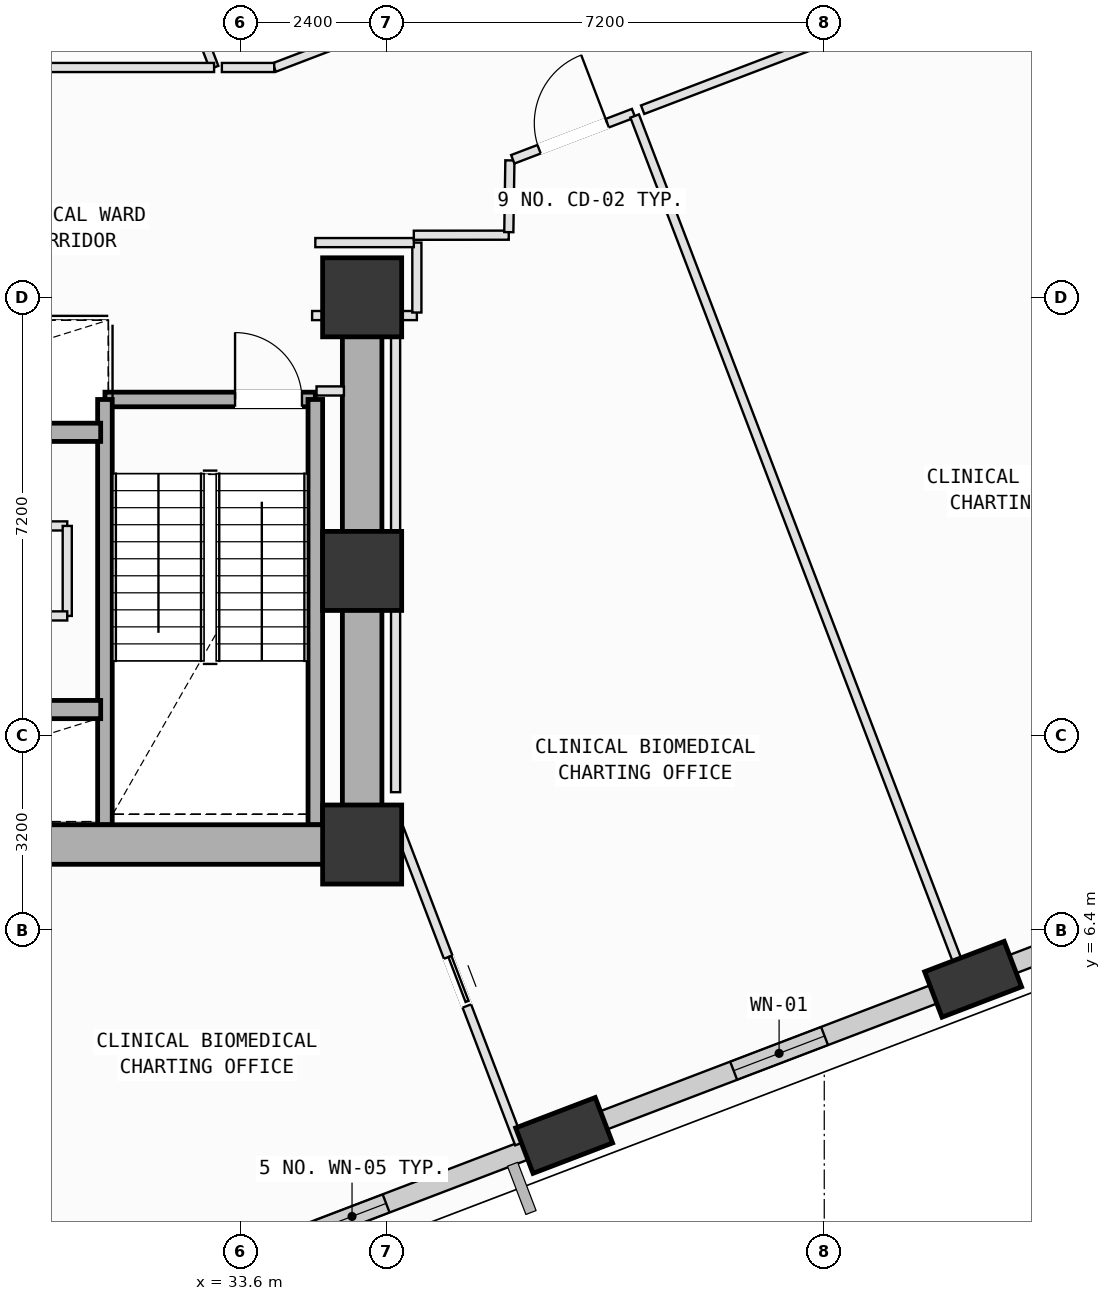
"""IFC4 building model, lengths in metres.
Left out: names, types, materials, properties, quantities, classifications, styles, units other than length and angle.
Written with IfcOpenShell. Run it as: python <this file> out.ifc"""

import sys

from ifc_helpers import new_model, si_unit, direction, frame, frame_2d, origin, origin_2d, place, context, subcontext, project, spatial, rectangle, extrude, element, fill, save


model = new_model("IFC4")
c1 = context("Model", 3, precision=1e-05, world=origin(), true_north=direction((0.0, 1.0)))
c2 = subcontext(c1, "Body", "Model", "MODEL_VIEW")
j1 = project(units=[si_unit("LENGTHUNIT", "METRE"), si_unit("PLANEANGLEUNIT", "RADIAN")], contexts=[c1])
p1 = place(None, origin())
s1 = spatial("IfcSite", under=j1, at=p1, CompositionType="ELEMENT")
p2 = place(p1, origin())
s2 = spatial("IfcBuilding", under=s1, at=p2, CompositionType="ELEMENT")
p3 = place(p2, frame((0.0, 0.0, 112.4)))
s3 = spatial("IfcBuildingStorey", under=s2, at=p3, CompositionType="ELEMENT", Elevation=112.4)
for number, where, z_axis, x_axis in (
    (1, (35.6, 7.8, 0.0), (0.0, 0.0, 1.0), (1.0, 0.0, 0.0)),
    (2, (35.6, 12.3, 0.0), (0.0, 0.0, 1.0), (1.0, 0.0, 0.0)),
    (3, (35.6, 16.8, 0.0), (0.0, 0.0, 1.0), (1.0, 0.0, 0.0)),
):
    element("IfcColumn", number, at=place(p3, frame(where, z_axis=z_axis, x_axis=x_axis)), inside=s3, PredefinedType="COLUMN", context=c2, shape_type="SweptSolid", body=[
        extrude(rectangle(XDim=1.3, YDim=1.3, at=origin_2d()), origin(), (0.0, 0.0, 1.0), 4.0),
    ])
p4 = place(p3, frame((38.922, 3.015, 0.002), z_axis=(0.089722632167, 0.02268918088, 0.995708315898), x_axis=(-0.573399819139, 0.818610197095, 0.033015036332)))
e4 = element("IfcColumn", 4, at=p4, inside=s3, PredefinedType="COLUMN", context=c2, shape_type="SweptSolid", body=[
    extrude(rectangle(XDim=1.4, YDim=0.8, at=origin_2d()), origin(), (0.0, 0.0, 1.0), 4.014),
])
p5 = place(p3, frame((45.648, 5.584, 0.002), z_axis=(0.078947790849, 0.050361148554, 0.995605846225), x_axis=(-0.801849419572, 0.596591609047, 0.033405992688)))
e5 = element("IfcColumn", 5, at=p5, inside=s3, PredefinedType="COLUMN", context=c2, shape_type="SweptSolid", body=[
    extrude(rectangle(XDim=1.4, YDim=0.8, at=origin_2d()), origin(), (0.0, 0.0, 1.0), 4.014),
])
p6 = place(p3, frame((38.631, 2.904, 0.0), z_axis=(0.0, 0.0, 1.0), x_axis=(-0.93420862639, -0.356727125936, 0.0)))
e6 = element("IfcWall", 6, at=p6, inside=s3, PredefinedType="SOLIDWALL", context=c2, shape_type="SweptSolid", body=[
    extrude(rectangle(XDim=6.214, YDim=0.32, at=frame_2d((3.107, 0.0))), origin(), (0.0, 0.0, 1.0), 3.165),
])
p7 = place(p6, frame((2.823, 0.0, 0.75)))
e7 = element("IfcOpeningElement", 7, at=p7, cuts=e6, PredefinedType="OPENING", context=c2, shape_type="SweptSolid", body=[
    extrude(rectangle(XDim=1.2, YDim=1.75, at=frame_2d((0.6, 0.875))), frame((0.0, 0.17, 0.0), z_axis=(0.0, -1.0, 0.0), x_axis=(1.0, 0.0, 0.0)), (0.0, 0.0, 1.0), 0.34),
])
p8 = place(p3, frame((45.358, 5.473, 0.0), z_axis=(0.0, 0.0, 1.0), x_axis=(-0.934195274734, -0.356762089724, 0.0)))
e8 = element("IfcWall", 8, at=p8, inside=s3, PredefinedType="SOLIDWALL", context=c2, shape_type="SweptSolid", body=[
    extrude(rectangle(XDim=6.209, YDim=0.32, at=frame_2d((3.104, 0.0))), origin(), (0.0, 0.0, 1.0), 3.165),
])
p9 = place(p8, frame((2.305, 0.0, 0.75)))
e9 = element("IfcOpeningElement", 9, at=p9, cuts=e8, PredefinedType="OPENING", context=c2, shape_type="SweptSolid", body=[
    extrude(rectangle(XDim=1.6, YDim=1.95, at=frame_2d((0.8, 0.975))), frame((0.0, 0.17, 0.0), z_axis=(0.0, -1.0, 0.0), x_axis=(1.0, 0.0, 0.0)), (0.0, 0.0, 1.0), 0.34),
])
p10 = place(p3, frame((52.091, 8.044, 0.0), z_axis=(0.0, 0.0, 1.0), x_axis=(-0.93419197885, -0.356770720005, 0.0)))
e10 = element("IfcWall", 10, at=p10, inside=s3, PredefinedType="SOLIDWALL", context=c2, shape_type="SweptSolid", body=[
    extrude(rectangle(XDim=6.218, YDim=0.32, at=frame_2d((3.109, 0.0))), origin(), (0.0, 0.0, 1.0), 3.165),
])
p11 = place(p10, frame((2.111, 0.0, 0.75)))
e11 = element("IfcOpeningElement", 11, at=p11, cuts=e10, PredefinedType="OPENING", context=c2, shape_type="SweptSolid", body=[
    extrude(rectangle(XDim=2.0, YDim=1.95, at=frame_2d((1.0, 0.975))), frame((0.0, 0.17, 0.0), z_axis=(0.0, -1.0, 0.0), x_axis=(1.0, 0.0, 0.0)), (0.0, 0.0, 1.0), 0.34),
])
p12 = place(p3, frame((31.37, 15.12, 0.0), z_axis=(0.0, 0.0, 1.0), x_axis=(1.0, 0.0, 0.0)))
e12 = element("IfcWall", 12, at=p12, inside=s3, PredefinedType="SOLIDWALL", context=c2, shape_type="SweptSolid", body=[
    extrude(rectangle(XDim=3.46, YDim=0.24, at=frame_2d((1.73, 0.0))), origin(), (0.0, 0.0, 1.0), 3.78),
])
p13 = place(p12, frame((2.14, 0.0, 0.0)))
e13 = element("IfcOpeningElement", 13, at=p13, cuts=e12, PredefinedType="OPENING", context=c2, shape_type="SweptSolid", body=[
    extrude(rectangle(XDim=1.1, YDim=2.15, at=frame_2d((0.55, 1.075))), frame((0.0, 0.13, 0.0), z_axis=(0.0, -1.0, 0.0), x_axis=(1.0, 0.0, 0.0)), (0.0, 0.0, 1.0), 0.26),
])
for number, where, z_axis, x_axis in (
    (14, (34.83, 15.12, 0.0), (0.0, 0.0, 1.0), (0.0, -1.0, 0.0)),
    (15, (31.37, 8.125, 0.0), (0.0, 0.0, 1.0), (0.0, 1.0, 0.0)),
):
    element("IfcWall", number, at=place(p3, frame(where, z_axis=z_axis, x_axis=x_axis)), inside=s3, PredefinedType="SOLIDWALL", context=c2, shape_type="SweptSolid", body=[
        extrude(rectangle(XDim=6.995, YDim=0.24, at=frame_2d((3.498, 0.0))), origin(), (0.0, 0.0, 1.0), 3.78),
    ])
p14 = place(p3, frame((24.8, 7.8, 0.0), z_axis=(0.0, 0.0, 1.0), x_axis=(1.0, 0.0, 0.0)))
e16 = element("IfcWall", 16, at=p14, inside=s3, PredefinedType="SHEAR", context=c2, shape_type="SweptSolid", body=[
    extrude(rectangle(XDim=10.8, YDim=0.65, at=frame_2d((5.4, 0.0))), origin(), (0.0, 0.0, 1.0), 3.78),
])
p15 = place(p3, frame((35.6, 7.8, 0.0), z_axis=(0.0, 0.0, 1.0), x_axis=(0.0, 1.0, 0.0)))
e17 = element("IfcWall", 17, at=p15, inside=s3, PredefinedType="SHEAR", context=c2, shape_type="SweptSolid", body=[
    extrude(rectangle(XDim=9.0, YDim=0.65, at=frame_2d((4.5, 0.0))), origin(), (0.0, 0.0, 1.0), 3.78),
])
p16 = place(p3, frame((25.85, 10.02, 0.0), z_axis=(0.0, 0.0, 1.0), x_axis=(1.0, 0.0, 0.0)))
e18 = element("IfcWall", 18, at=p16, inside=s3, PredefinedType="SOLIDWALL", context=c2, shape_type="SweptSolid", body=[
    extrude(rectangle(XDim=5.45, YDim=0.3, at=frame_2d((2.725, 0.0))), origin(), (0.0, 0.0, 1.0), 3.78),
])
p17 = place(p16, frame((0.34, 0.0, 0.0)))
e19 = element("IfcOpeningElement", 19, at=p17, cuts=e18, PredefinedType="OPENING", context=c2, shape_type="SweptSolid", body=[
    extrude(rectangle(XDim=1.12, YDim=2.15, at=frame_2d((0.56, 1.075))), frame((0.0, 0.16, 0.0), z_axis=(0.0, -1.0, 0.0), x_axis=(1.0, 0.0, 0.0)), (0.0, 0.0, 1.0), 0.32),
])
p18 = place(p16, frame((2.24, 0.0, 0.0)))
e20 = element("IfcOpeningElement", 20, at=p18, cuts=e18, PredefinedType="OPENING", context=c2, shape_type="SweptSolid", body=[
    extrude(rectangle(XDim=1.12, YDim=2.15, at=frame_2d((0.56, 1.075))), frame((0.0, 0.16, 0.0), z_axis=(0.0, -1.0, 0.0), x_axis=(1.0, 0.0, 0.0)), (0.0, 0.0, 1.0), 0.32),
])
p19 = place(p3, frame((25.85, 14.58, 0.0), z_axis=(0.0, 0.0, 1.0), x_axis=(1.0, 0.0, 0.0)))
e21 = element("IfcWall", 21, at=p19, inside=s3, PredefinedType="SOLIDWALL", context=c2, shape_type="SweptSolid", body=[
    extrude(rectangle(XDim=5.45, YDim=0.3, at=frame_2d((2.725, 0.0))), origin(), (0.0, 0.0, 1.0), 3.78),
])
p20 = place(p3, frame((28.6, 13.04, 0.0), z_axis=(0.0, 0.0, 1.0), x_axis=(1.0, 0.0, 0.0)))
e22 = element("IfcWall", 22, at=p20, inside=s3, PredefinedType="PARTITIONING", context=c2, shape_type="SweptSolid", body=[
    extrude(rectangle(XDim=2.15, YDim=0.15, at=frame_2d((1.075, 0.0))), origin(), (0.0, 0.0, 1.0), 3.78),
])
p21 = place(p20, frame((0.615, 0.0, 0.0)))
e23 = element("IfcOpeningElement", 23, at=p21, cuts=e22, PredefinedType="OPENING", context=c2, shape_type="SweptSolid", body=[
    extrude(rectangle(XDim=0.92, YDim=2.1, at=frame_2d((0.46, 1.05))), frame((0.0, 0.085, 0.0), z_axis=(0.0, -1.0, 0.0), x_axis=(1.0, 0.0, 0.0)), (0.0, 0.0, 1.0), 0.17),
])
p22 = place(p3, frame((30.75, 13.04, 0.0), z_axis=(0.0, 0.0, 1.0), x_axis=(0.0, -1.0, 0.0)))
e24 = element("IfcWall", 24, at=p22, inside=s3, PredefinedType="PARTITIONING", context=c2, shape_type="SweptSolid", body=[
    extrude(rectangle(XDim=1.48, YDim=0.15, at=frame_2d((0.74, 0.0))), origin(), (0.0, 0.0, 1.0), 3.78),
])
p23 = place(p3, frame((30.75, 11.56, 0.0), z_axis=(0.0, 0.0, 1.0), x_axis=(-1.0, 0.0, 0.0)))
e25 = element("IfcWall", 25, at=p23, inside=s3, PredefinedType="PARTITIONING", context=c2, shape_type="SweptSolid", body=[
    extrude(rectangle(XDim=2.15, YDim=0.15, at=frame_2d((1.075, 0.0))), origin(), (0.0, 0.0, 1.0), 3.78),
])
p24 = place(p3, frame((28.016, 7.651, 0.0), z_axis=(0.0, 0.0, 1.0), x_axis=(0.356612934279, -0.934252222424, 0.0)))
e26 = element("IfcWall", 26, at=p24, inside=s3, PredefinedType="PARTITIONING", context=c2, shape_type="SweptSolid", body=[
    extrude(rectangle(XDim=8.087, YDim=0.15, at=frame_2d((4.043, 0.0))), origin(), (0.0, 0.0, 1.0), 3.78),
])
p25 = place(p24, frame((3.774, 0.0, 0.0)))
e27 = element("IfcOpeningElement", 27, at=p25, cuts=e26, PredefinedType="OPENING", context=c2, shape_type="SweptSolid", body=[
    extrude(rectangle(XDim=0.86, YDim=2.06, at=frame_2d((0.43, 1.03))), frame((0.0, 0.085, 0.0), z_axis=(0.0, -1.0, 0.0), x_axis=(1.0, 0.0, 0.0)), (0.0, 0.0, 1.0), 0.17),
])
p26 = place(p3, frame((36.15, 8.213, 0.0), z_axis=(0.0, 0.0, 1.0), x_axis=(0.356777557766, -0.934189367459, 0.0)))
e28 = element("IfcWall", 28, at=p26, inside=s3, PredefinedType="PARTITIONING", context=c2, shape_type="SweptSolid", body=[
    extrude(rectangle(XDim=5.71, YDim=0.15, at=frame_2d((2.855, 0.0))), origin(), (0.0, 0.0, 1.0), 3.78),
])
p27 = place(p26, frame((2.425, 0.0, 0.0)))
e29 = element("IfcOpeningElement", 29, at=p27, cuts=e28, PredefinedType="OPENING", context=c2, shape_type="SweptSolid", body=[
    extrude(rectangle(XDim=0.86, YDim=2.06, at=frame_2d((0.43, 1.03))), frame((0.0, 0.085, 0.0), z_axis=(0.0, -1.0, 0.0), x_axis=(1.0, 0.0, 0.0)), (0.0, 0.0, 1.0), 0.17),
])
p28 = place(p3, frame((35.6, 7.5, 0.0), z_axis=(0.0, 0.0, 1.0), x_axis=(1.0, 0.0, 0.0)))
e30 = element("IfcWall", 30, at=p28, inside=s3, PredefinedType="PARTITIONING", context=c2, shape_type="SweptSolid", body=[
    extrude(rectangle(XDim=0.55, YDim=0.15, at=frame_2d((0.275, 0.0))), origin(), (0.0, 0.0, 1.0), 2.965),
])
p29 = place(p3, frame((34.777, 16.5, 0.0), z_axis=(0.0, 0.0, 1.0), x_axis=(1.0, 0.0, 0.0)))
e31 = element("IfcWall", 31, at=p29, inside=s3, PredefinedType="PARTITIONING", context=c2, shape_type="SweptSolid", body=[
    extrude(rectangle(XDim=0.523, YDim=0.15, at=frame_2d((0.261, 0.0))), origin(), (0.0, 0.0, 1.0), 2.965),
])
p30 = place(p3, frame((35.9, 16.5, 0.0), z_axis=(0.0, 0.0, 1.0), x_axis=(1.0, 0.0, 0.0)))
e32 = element("IfcWall", 32, at=p30, inside=s3, PredefinedType="PARTITIONING", context=c2, shape_type="SweptSolid", body=[
    extrude(rectangle(XDim=0.6, YDim=0.15, at=frame_2d((0.3, 0.0))), origin(), (0.0, 0.0, 1.0), 2.965),
])
p31 = place(p3, frame((36.5, 16.55, 0.0), z_axis=(0.0, 0.0, 1.0), x_axis=(0.0, 1.0, 0.0)))
e33 = element("IfcWall", 33, at=p31, inside=s3, PredefinedType="PARTITIONING", context=c2, shape_type="SweptSolid", body=[
    extrude(rectangle(XDim=1.15, YDim=0.15, at=frame_2d((0.575, 0.0))), origin(), (0.0, 0.0, 1.0), 3.78),
])
p32 = place(p3, frame((36.45, 17.7, 0.0), z_axis=(0.0, 0.0, 1.0), x_axis=(-1.0, 0.0, 0.0)))
e34 = element("IfcWall", 34, at=p32, inside=s3, PredefinedType="PARTITIONING", context=c2, shape_type="SweptSolid", body=[
    extrude(rectangle(XDim=1.62, YDim=0.15, at=frame_2d((0.81, 0.0))), origin(), (0.0, 0.0, 1.0), 3.78),
])
p33 = place(p3, frame((36.45, 17.821, 0.0), z_axis=(0.0, 0.0, 1.0), x_axis=(0.999999804321, 0.000625586365, 0.0)))
e35 = element("IfcWall", 35, at=p33, inside=s3, PredefinedType="PARTITIONING", context=c2, shape_type="SweptSolid", body=[
    extrude(rectangle(XDim=1.561, YDim=0.15, at=frame_2d((0.781, 0.0))), origin(), (0.0, 0.0, 1.0), 2.965),
])
p34 = place(p3, frame((38.012, 17.872, 0.0), z_axis=(0.0, 0.0, 1.0), x_axis=(0.015309606307, 0.99988280111, 0.0)))
e36 = element("IfcWall", 36, at=p34, inside=s3, PredefinedType="PARTITIONING", context=c2, shape_type="SweptSolid", body=[
    extrude(rectangle(XDim=1.18, YDim=0.15, at=frame_2d((0.59, 0.0))), origin(), (0.0, 0.0, 1.0), 3.78),
])
p35 = place(p3, frame((38.077, 19.07, 0.0), z_axis=(0.0, 0.0, 1.0), x_axis=(0.934165524449, 0.356839982248, 0.0)))
e37 = element("IfcWall", 37, at=p35, inside=s3, PredefinedType="PARTITIONING", context=c2, shape_type="SweptSolid", body=[
    extrude(rectangle(XDim=2.127, YDim=0.15, at=frame_2d((1.063, 0.0))), origin(), (0.0, 0.0, 1.0), 2.945),
])
p36 = place(p35, frame((0.463, 0.0, 0.0)))
e38 = element("IfcOpeningElement", 38, at=p36, cuts=e37, PredefinedType="OPENING", context=c2, shape_type="SweptSolid", body=[
    extrude(rectangle(XDim=1.2, YDim=2.15, at=frame_2d((0.6, 1.075))), frame((0.0, 0.085, 0.0), z_axis=(0.0, -1.0, 0.0), x_axis=(1.0, 0.0, 0.0)), (0.0, 0.0, 1.0), 0.17),
])
p37 = place(p3, frame((40.082, 19.782, 0.0), z_axis=(0.0, 0.0, 1.0), x_axis=(0.356731098137, -0.934207109597, 0.0)))
e39 = element("IfcWall", 39, at=p37, inside=s3, PredefinedType="PARTITIONING", context=c2, shape_type="SweptSolid", body=[
    extrude(rectangle(XDim=15.479, YDim=0.15, at=frame_2d((7.74, 0.0))), origin(), (0.0, 0.0, 1.0), 3.78),
])
p38 = place(p3, frame((39.639, 3.043, 0.0), z_axis=(0.0, 0.0, 1.0), x_axis=(-0.934073578561, -0.357080592912, 0.0)))
e40 = element("IfcWall", 40, at=p38, inside=s3, PredefinedType="PARTITIONING", context=c2, shape_type="SweptSolid", body=[
    extrude(rectangle(XDim=0.991, YDim=0.15, at=frame_2d((0.496, 0.0))), origin(), (0.0, 0.0, 1.0), 3.165),
])
p39 = place(p3, frame((36.15, 8.661, 0.0), z_axis=(0.0, 0.0, 1.0), x_axis=(0.0, 1.0, 0.0)))
e41 = element("IfcWall", 41, at=p39, inside=s3, PredefinedType="PARTITIONING", context=c2, shape_type="SweptSolid", body=[
    extrude(rectangle(XDim=7.679, YDim=0.15, at=frame_2d((3.84, 0.0))), origin(), (0.0, 0.0, 1.0), 3.78),
])
p40 = place(p3, frame((35.3, 15.26, 0.0), z_axis=(0.0, 0.0, 1.0), x_axis=(-1.0, 0.0, 0.0)))
e42 = element("IfcWall", 42, at=p40, inside=s3, PredefinedType="PARTITIONING", context=c2, shape_type="SweptSolid", body=[
    extrude(rectangle(XDim=0.45, YDim=0.15, at=frame_2d((0.225, 0.0))), origin(), (0.0, 0.0, 1.0), 3.78),
])
p41 = place(p3, frame((40.213, 19.886, 0.0), z_axis=(0.0, 0.0, 1.0), x_axis=(0.93423542168, 0.356656945646, 0.0)))
e43 = element("IfcWall", 43, at=p41, inside=s3, PredefinedType="PARTITIONING", context=c2, shape_type="SweptSolid", body=[
    extrude(rectangle(XDim=7.641, YDim=0.15, at=frame_2d((3.82, 0.0))), origin(), (0.0, 0.0, 1.0), 3.78),
])
p42 = place(p41, frame((3.22, 0.0, 0.0)))
e44 = element("IfcOpeningElement", 44, at=p42, cuts=e43, PredefinedType="OPENING", context=c2, shape_type="SweptSolid", body=[
    extrude(rectangle(XDim=1.2, YDim=2.15, at=frame_2d((0.6, 1.075))), frame((0.0, 0.085, 0.0), z_axis=(0.0, -1.0, 0.0), x_axis=(1.0, 0.0, 0.0)), (0.0, 0.0, 1.0), 0.17),
])
p43 = place(p3, frame((46.364, 5.611, 0.0), z_axis=(0.0, 0.0, 1.0), x_axis=(-0.934304300347, -0.356476470967, 0.0)))
e45 = element("IfcWall", 45, at=p43, inside=s3, PredefinedType="PARTITIONING", context=c2, shape_type="SweptSolid", body=[
    extrude(rectangle(XDim=0.654, YDim=0.15, at=frame_2d((0.327, 0.0))), origin(), (0.0, 0.0, 1.0), 3.165),
])
p44 = place(p3, frame((32.344, 22.731, 0.0), z_axis=(0.0, 0.0, 1.0), x_axis=(0.356625840628, -0.934247295846, 0.0)))
e46 = element("IfcWall", 46, at=p44, inside=s3, PredefinedType="PARTITIONING", context=c2, shape_type="SweptSolid", body=[
    extrude(rectangle(XDim=2.302, YDim=0.15, at=frame_2d((1.151, 0.0))), origin(), (0.0, 0.0, 1.0), 3.78),
])
p45 = place(p3, frame((33.165, 20.58, 0.0), z_axis=(0.0, 0.0, 1.0), x_axis=(-1.0, 0.0, 0.0)))
e47 = element("IfcWall", 47, at=p45, inside=s3, PredefinedType="PARTITIONING", context=c2, shape_type="SweptSolid", body=[
    extrude(rectangle(XDim=4.56, YDim=0.15, at=frame_2d((2.28, 0.0))), origin(), (0.0, 0.0, 1.0), 3.78),
])
p46 = place(p3, frame((44.852, 24.665, 0.0), z_axis=(0.0, 0.0, 1.0), x_axis=(-0.934210506375, -0.35672220253, 0.0)))
e48 = element("IfcWall", 48, at=p46, inside=s3, PredefinedType="PARTITIONING", context=c2, shape_type="SweptSolid", body=[
    extrude(rectangle(XDim=11.451, YDim=0.15, at=frame_2d((5.726, 0.0))), origin(), (0.0, 0.0, 1.0), 2.945),
])
p47 = place(p46, frame((5.126, 0.0, 0.0)))
e49 = element("IfcOpeningElement", 49, at=p47, cuts=e48, PredefinedType="OPENING", context=c2, shape_type="SweptSolid", body=[
    extrude(rectangle(XDim=1.2, YDim=2.15, at=frame_2d((0.6, 1.075))), frame((0.0, 0.085, 0.0), z_axis=(0.0, -1.0, 0.0), x_axis=(1.0, 0.0, 0.0)), (0.0, 0.0, 1.0), 0.17),
])
p48 = place(p3, frame((34.154, 20.58, 0.0), z_axis=(0.0, 0.0, 1.0), x_axis=(-1.0, 0.0, 0.0)))
e50 = element("IfcWall", 50, at=p48, inside=s3, PredefinedType="PARTITIONING", context=c2, shape_type="SweptSolid", body=[
    extrude(rectangle(XDim=0.861, YDim=0.15, at=frame_2d((0.431, 0.0))), origin(), (0.0, 0.0, 1.0), 3.78),
])
p49 = place(p7, origin())
e51 = element("IfcWindow", 51, at=p49, inside=s3, PartitioningType="SINGLE_PANEL", PredefinedType="WINDOW", context=c2, shape_type="SweptSolid", body=[
    extrude(rectangle(XDim=1.2, YDim=1.75, at=frame_2d((0.6, 0.875))), frame((0.0, 0.03, 0.0), z_axis=(0.0, -1.0, 0.0), x_axis=(1.0, 0.0, 0.0)), (0.0, 0.0, 1.0), 0.06),
])
fill(e7, e51)
p50 = place(p9, origin())
e52 = element("IfcWindow", 52, at=p50, inside=s3, PartitioningType="SINGLE_PANEL", PredefinedType="WINDOW", context=c2, shape_type="SweptSolid", body=[
    extrude(rectangle(XDim=1.6, YDim=1.95, at=frame_2d((0.8, 0.975))), frame((0.0, 0.03, 0.0), z_axis=(0.0, -1.0, 0.0), x_axis=(1.0, 0.0, 0.0)), (0.0, 0.0, 1.0), 0.06),
])
fill(e9, e52)
p51 = place(p13, origin())
e53 = element("IfcDoor", 53, at=p51, inside=s3, OperationType="SINGLE_SWING_LEFT", PredefinedType="DOOR", context=c2, shape_type="SweptSolid", body=[
    extrude(rectangle(XDim=1.1, YDim=2.15, at=frame_2d((0.55, 1.075))), frame((0.0, 0.025, 0.0), z_axis=(0.0, -1.0, 0.0), x_axis=(1.0, 0.0, 0.0)), (0.0, 0.0, 1.0), 0.05),
])
fill(e13, e53)
p52 = place(p36, origin())
e54 = element("IfcDoor", 54, at=p52, inside=s3, OperationType="SINGLE_SWING_RIGHT", PredefinedType="DOOR", context=c2, shape_type="SweptSolid", body=[
    extrude(rectangle(XDim=1.2, YDim=2.15, at=frame_2d((0.6, 1.075))), frame((0.0, 0.025, 0.0), z_axis=(0.0, -1.0, 0.0), x_axis=(1.0, 0.0, 0.0)), (0.0, 0.0, 1.0), 0.05),
])
fill(e38, e54)
p53 = place(p27, origin())
e55 = element("IfcDoor", 55, at=p53, inside=s3, OperationType="SLIDING_TO_LEFT", PredefinedType="DOOR", context=c2, shape_type="SweptSolid", body=[
    extrude(rectangle(XDim=0.86, YDim=2.06, at=frame_2d((0.43, 1.03))), frame((0.0, 0.025, 0.0), z_axis=(0.0, -1.0, 0.0), x_axis=(1.0, 0.0, 0.0)), (0.0, 0.0, 1.0), 0.05),
])
fill(e29, e55)
save(model, sys.argv[1])
